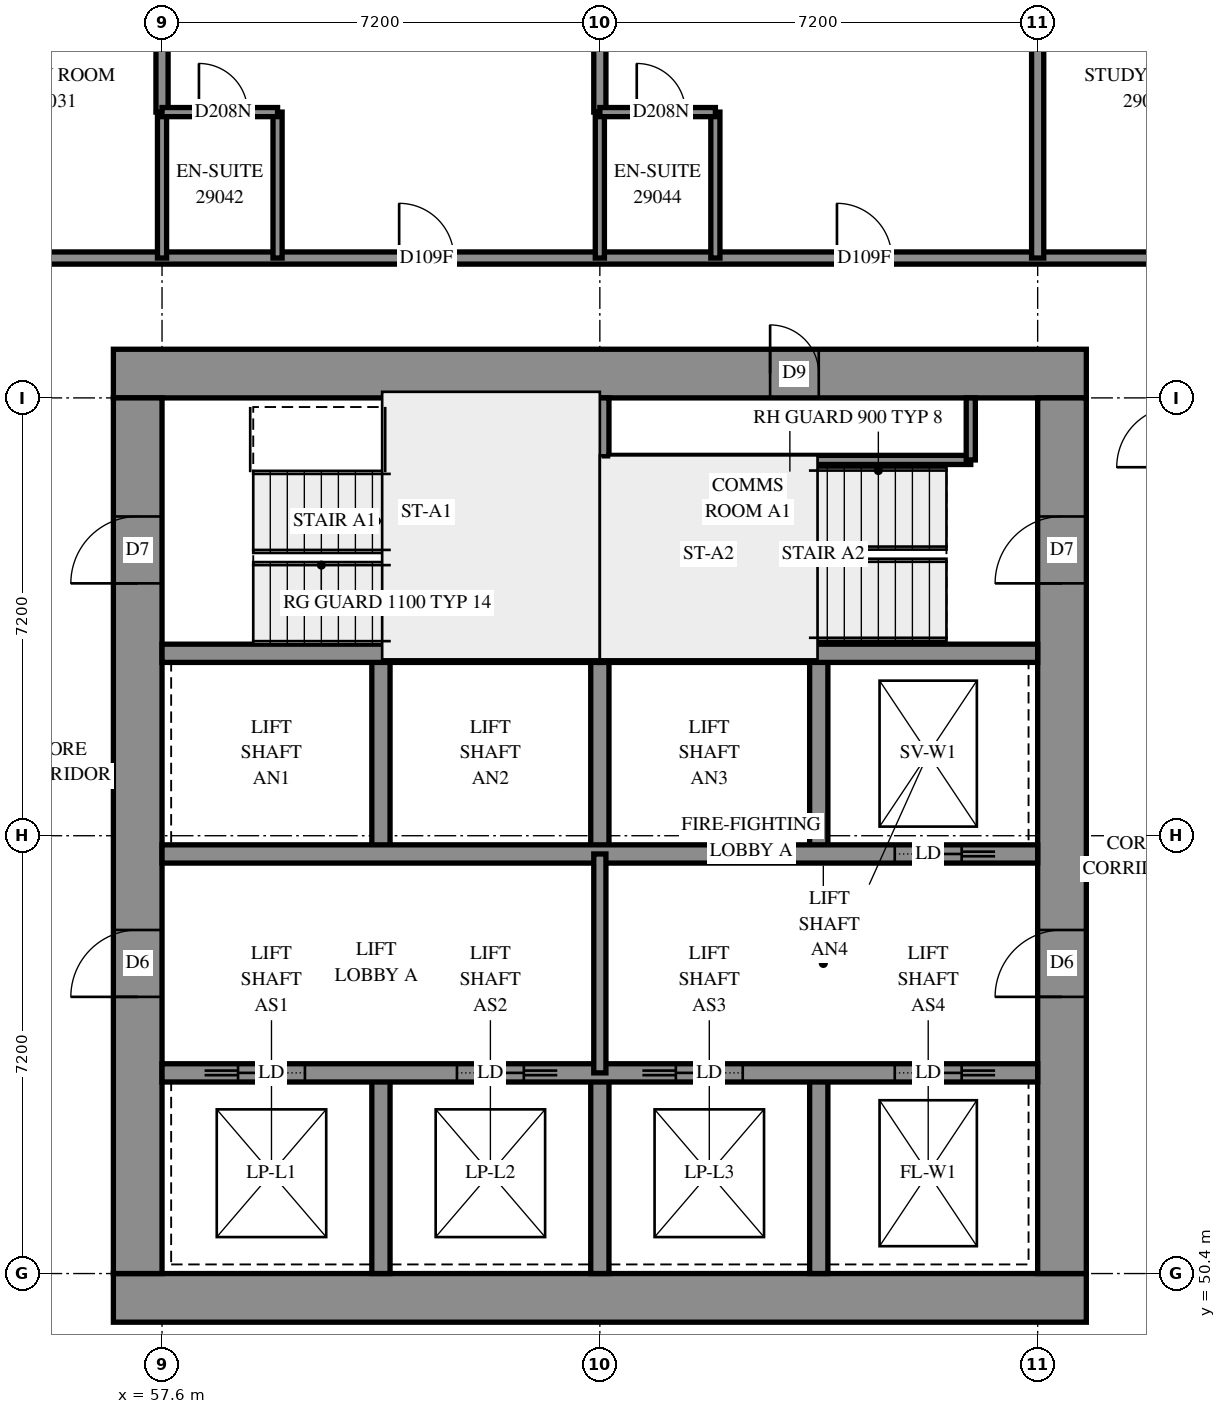
"""IFC4 building model, lengths in metres.
Left out: names, types, materials, properties, quantities, classifications, styles, units other than length and angle.
Written with IfcOpenShell. Run it as: python <this file> out.ifc"""

import sys

from ifc_helpers import new_model, si_unit, direction, frame, frame_2d, origin, place, context, subcontext, project, spatial, rectangle, extrude, element, fill, save


model = new_model("IFC4")
c1 = context("Model", 3, precision=1e-05, world=origin(), true_north=direction((0.0, 1.0)))
c2 = subcontext(c1, "Body", "Model", "MODEL_VIEW")
j1 = project(units=[si_unit("LENGTHUNIT", "METRE"), si_unit("PLANEANGLEUNIT", "RADIAN")], contexts=[c1])
p1 = place(None, origin())
s1 = spatial("IfcSite", under=j1, at=p1, CompositionType="ELEMENT")
p2 = place(p1, origin())
s2 = spatial("IfcBuilding", under=s1, at=p2, CompositionType="ELEMENT")
p3 = place(p2, frame((0.0, 0.0, 108.4)))
s3 = spatial("IfcBuildingStorey", under=s2, at=p3, CompositionType="ELEMENT", Elevation=108.4)
p4 = place(p3, frame((56.8, 50.0, -0.3), z_axis=(0.0, 0.0, 1.0), x_axis=(1.0, 0.0, 0.0)))
e1 = element("IfcWall", 1, at=p4, inside=s3, PredefinedType="SHEAR", context=c2, shape_type="SweptSolid", body=[
    extrude(rectangle(XDim=16.0, YDim=0.8, at=frame_2d((8.0, 0.0))), origin(), (0.0, 0.0, 1.0), 2.7),
])
p5 = place(p3, frame((56.8, 65.2, -0.3), z_axis=(0.0, 0.0, 1.0), x_axis=(1.0, 0.0, 0.0)))
e2 = element("IfcWall", 2, at=p5, inside=s3, PredefinedType="SHEAR", context=c2, shape_type="SweptSolid", body=[
    extrude(rectangle(XDim=16.0, YDim=0.8, at=frame_2d((8.0, 0.0))), origin(), (0.0, 0.0, 1.0), 2.7),
])
p6 = place(p5, frame((10.8, 0.0, 0.3)))
e3 = element("IfcOpeningElement", 3, at=p6, cuts=e2, PredefinedType="OPENING", context=c2, shape_type="SweptSolid", body=[
    extrude(rectangle(XDim=0.8, YDim=2.1, at=frame_2d((0.4, 1.05))), frame((0.0, 0.41, 0.0), z_axis=(0.0, -1.0, 0.0), x_axis=(1.0, 0.0, 0.0)), (0.0, 0.0, 1.0), 0.82),
])
p7 = place(p3, frame((57.2, 50.4, -0.3), z_axis=(0.0, 0.0, 1.0), x_axis=(0.0, 1.0, 0.0)))
e4 = element("IfcWall", 4, at=p7, inside=s3, PredefinedType="SHEAR", context=c2, shape_type="SweptSolid", body=[
    extrude(rectangle(XDim=14.4, YDim=0.8, at=frame_2d((7.2, 0.0))), origin(), (0.0, 0.0, 1.0), 2.7),
])
p8 = place(p7, frame((4.55, 0.0, 0.3)))
e5 = element("IfcOpeningElement", 5, at=p8, cuts=e4, PredefinedType="OPENING", context=c2, shape_type="SweptSolid", body=[
    extrude(rectangle(XDim=1.1, YDim=2.1, at=frame_2d((0.55, 1.05))), frame((0.0, 0.41, 0.0), z_axis=(0.0, -1.0, 0.0), x_axis=(1.0, 0.0, 0.0)), (0.0, 0.0, 1.0), 0.82),
])
p9 = place(p7, frame((11.35, 0.0, 0.3)))
e6 = element("IfcOpeningElement", 6, at=p9, cuts=e4, PredefinedType="OPENING", context=c2, shape_type="SweptSolid", body=[
    extrude(rectangle(XDim=1.1, YDim=2.1, at=frame_2d((0.55, 1.05))), frame((0.0, 0.41, 0.0), z_axis=(0.0, -1.0, 0.0), x_axis=(1.0, 0.0, 0.0)), (0.0, 0.0, 1.0), 0.82),
])
p10 = place(p3, frame((72.4, 50.4, -0.3), z_axis=(0.0, 0.0, 1.0), x_axis=(0.0, 1.0, 0.0)))
e7 = element("IfcWall", 7, at=p10, inside=s3, PredefinedType="SHEAR", context=c2, shape_type="SweptSolid", body=[
    extrude(rectangle(XDim=14.4, YDim=0.8, at=frame_2d((7.2, 0.0))), origin(), (0.0, 0.0, 1.0), 2.7),
])
p11 = place(p10, frame((4.55, 0.0, 0.3)))
e8 = element("IfcOpeningElement", 8, at=p11, cuts=e7, PredefinedType="OPENING", context=c2, shape_type="SweptSolid", body=[
    extrude(rectangle(XDim=1.1, YDim=2.1, at=frame_2d((0.55, 1.05))), frame((0.0, 0.41, 0.0), z_axis=(0.0, -1.0, 0.0), x_axis=(1.0, 0.0, 0.0)), (0.0, 0.0, 1.0), 0.82),
])
p12 = place(p10, frame((11.35, 0.0, 0.3)))
e9 = element("IfcOpeningElement", 9, at=p12, cuts=e7, PredefinedType="OPENING", context=c2, shape_type="SweptSolid", body=[
    extrude(rectangle(XDim=1.1, YDim=2.1, at=frame_2d((0.55, 1.05))), frame((0.0, 0.41, 0.0), z_axis=(0.0, -1.0, 0.0), x_axis=(1.0, 0.0, 0.0)), (0.0, 0.0, 1.0), 0.82),
])
for number, where, z_axis, x_axis in (
    (10, (61.2, 50.4, 0.0), (0.0, 0.0, 1.0), (0.0, 1.0, 0.0)),
    (11, (61.2, 57.3, 0.0), (0.0, 0.0, 1.0), (0.0, 1.0, 0.0)),
    (12, (64.8, 50.4, 0.0), (0.0, 0.0, 1.0), (0.0, 1.0, 0.0)),
    (13, (64.8, 57.3, 0.0), (0.0, 0.0, 1.0), (0.0, 1.0, 0.0)),
    (14, (68.4, 50.4, 0.0), (0.0, 0.0, 1.0), (0.0, 1.0, 0.0)),
    (15, (68.4, 57.3, 0.0), (0.0, 0.0, 1.0), (0.0, 1.0, 0.0)),
):
    element("IfcWall", number, at=place(p3, frame(where, z_axis=z_axis, x_axis=x_axis)), inside=s3, PredefinedType="SOLIDWALL", context=c2, shape_type="SweptSolid", body=[
        extrude(rectangle(XDim=3.3, YDim=0.3, at=frame_2d((1.65, 0.0))), origin(), (0.0, 0.0, 1.0), 3.1),
    ])
p13 = place(p3, frame((57.6, 53.7, 0.0), z_axis=(0.0, 0.0, 1.0), x_axis=(1.0, 0.0, 0.0)))
e16 = element("IfcWall", 16, at=p13, inside=s3, PredefinedType="SOLIDWALL", context=c2, shape_type="SweptSolid", body=[
    extrude(rectangle(XDim=14.4, YDim=0.3, at=frame_2d((7.2, 0.0))), origin(), (0.0, 0.0, 1.0), 3.1),
])
p14 = place(p13, frame((1.25, 0.0, 0.0)))
e17 = element("IfcOpeningElement", 17, at=p14, cuts=e16, PredefinedType="OPENING", context=c2, shape_type="SweptSolid", body=[
    extrude(rectangle(XDim=1.1, YDim=2.1, at=frame_2d((0.55, 1.05))), frame((0.0, 0.16, 0.0), z_axis=(0.0, -1.0, 0.0), x_axis=(1.0, 0.0, 0.0)), (0.0, 0.0, 1.0), 0.32),
])
p15 = place(p13, frame((4.85, 0.0, 0.0)))
e18 = element("IfcOpeningElement", 18, at=p15, cuts=e16, PredefinedType="OPENING", context=c2, shape_type="SweptSolid", body=[
    extrude(rectangle(XDim=1.1, YDim=2.1, at=frame_2d((0.55, 1.05))), frame((0.0, 0.16, 0.0), z_axis=(0.0, -1.0, 0.0), x_axis=(1.0, 0.0, 0.0)), (0.0, 0.0, 1.0), 0.32),
])
p16 = place(p13, frame((8.45, 0.0, 0.0)))
e19 = element("IfcOpeningElement", 19, at=p16, cuts=e16, PredefinedType="OPENING", context=c2, shape_type="SweptSolid", body=[
    extrude(rectangle(XDim=1.1, YDim=2.1, at=frame_2d((0.55, 1.05))), frame((0.0, 0.16, 0.0), z_axis=(0.0, -1.0, 0.0), x_axis=(1.0, 0.0, 0.0)), (0.0, 0.0, 1.0), 0.32),
])
p17 = place(p13, frame((12.05, 0.0, 0.0)))
e20 = element("IfcOpeningElement", 20, at=p17, cuts=e16, PredefinedType="OPENING", context=c2, shape_type="SweptSolid", body=[
    extrude(rectangle(XDim=1.1, YDim=2.1, at=frame_2d((0.55, 1.05))), frame((0.0, 0.16, 0.0), z_axis=(0.0, -1.0, 0.0), x_axis=(1.0, 0.0, 0.0)), (0.0, 0.0, 1.0), 0.32),
])
p18 = place(p3, frame((57.6, 57.3, 0.0), z_axis=(0.0, 0.0, 1.0), x_axis=(1.0, 0.0, 0.0)))
e21 = element("IfcWall", 21, at=p18, inside=s3, PredefinedType="SOLIDWALL", context=c2, shape_type="SweptSolid", body=[
    extrude(rectangle(XDim=14.4, YDim=0.3, at=frame_2d((7.2, 0.0))), origin(), (0.0, 0.0, 1.0), 3.1),
])
p19 = place(p18, frame((12.05, 0.0, 0.0)))
e22 = element("IfcOpeningElement", 22, at=p19, cuts=e21, PredefinedType="OPENING", context=c2, shape_type="SweptSolid", body=[
    extrude(rectangle(XDim=1.1, YDim=2.1, at=frame_2d((0.55, 1.05))), frame((0.0, 0.16, 0.0), z_axis=(0.0, -1.0, 0.0), x_axis=(1.0, 0.0, 0.0)), (0.0, 0.0, 1.0), 0.32),
])
for number, where, z_axis, x_axis in (
    (23, (57.6, 60.6, 0.0), (0.0, 0.0, 1.0), (1.0, 0.0, 0.0)),
    (24, (64.8, 60.6, 0.0), (0.0, 0.0, 1.0), (1.0, 0.0, 0.0)),
):
    element("IfcWall", number, at=place(p3, frame(where, z_axis=z_axis, x_axis=x_axis)), inside=s3, PredefinedType="SOLIDWALL", context=c2, shape_type="SweptSolid", body=[
        extrude(rectangle(XDim=7.2, YDim=0.3, at=frame_2d((3.6, 0.0))), origin(), (0.0, 0.0, 1.0), 3.1),
    ])
p20 = place(p3, frame((64.8, 60.6, 0.0), z_axis=(0.0, 0.0, 1.0), x_axis=(0.0, 1.0, 0.0)))
e25 = element("IfcWall", 25, at=p20, inside=s3, PredefinedType="SOLIDWALL", context=c2, shape_type="SweptSolid", body=[
    extrude(rectangle(XDim=4.2, YDim=0.3, at=frame_2d((2.1, 0.0))), origin(), (0.0, 0.0, 1.0), 3.1),
])
p21 = place(p3, frame((64.95, 63.78, 0.0), z_axis=(0.0, 0.0, 1.0), x_axis=(1.0, 0.0, 0.0)))
e26 = element("IfcWall", 26, at=p21, inside=s3, PredefinedType="PARTITIONING", context=c2, shape_type="SweptSolid", body=[
    extrude(rectangle(XDim=5.95, YDim=0.15, at=frame_2d((2.975, 0.0))), origin(), (0.0, 0.0, 1.0), 3.1),
])
p22 = place(p3, frame((70.9, 63.78, 0.0), z_axis=(0.0, 0.0, 1.0), x_axis=(0.0, 1.0, 0.0)))
e27 = element("IfcWall", 27, at=p22, inside=s3, PredefinedType="PARTITIONING", context=c2, shape_type="SweptSolid", body=[
    extrude(rectangle(XDim=1.02, YDim=0.15, at=frame_2d((0.51, 0.0))), origin(), (0.0, 0.0, 1.0), 3.1),
])
p23 = place(p3, frame((64.8, 53.7, 0.0), z_axis=(0.0, 0.0, 1.0), x_axis=(0.0, 1.0, 0.0)))
e28 = element("IfcWall", 28, at=p23, inside=s3, PredefinedType="PARTITIONING", context=c2, shape_type="SweptSolid", body=[
    extrude(rectangle(XDim=3.6, YDim=0.2, at=frame_2d((1.8, 0.0))), origin(), (0.0, 0.0, 1.0), 3.1),
])
p24 = place(p3, frame((55.3, 67.1, 0.0), z_axis=(0.0, 0.0, 1.0), x_axis=(1.0, 0.0, 0.0)))
e29 = element("IfcWall", 29, at=p24, inside=s3, PredefinedType="PARTITIONING", context=c2, shape_type="SweptSolid", body=[
    extrude(rectangle(XDim=19.0, YDim=0.2, at=frame_2d((9.5, 0.0))), origin(), (0.0, 0.0, 1.0), 3.1),
])
p25 = place(p24, frame((6.199, 0.0, 0.0)))
e30 = element("IfcOpeningElement", 30, at=p25, cuts=e29, PredefinedType="OPENING", context=c2, shape_type="SweptSolid", body=[
    extrude(rectangle(XDim=0.9, YDim=2.1, at=frame_2d((0.45, 1.05))), frame((0.0, 0.11, 0.0), z_axis=(0.0, -1.0, 0.0), x_axis=(1.0, 0.0, 0.0)), (0.0, 0.0, 1.0), 0.22),
])
p26 = place(p24, frame((13.399, 0.0, 0.0)))
e31 = element("IfcOpeningElement", 31, at=p26, cuts=e29, PredefinedType="OPENING", context=c2, shape_type="SweptSolid", body=[
    extrude(rectangle(XDim=0.9, YDim=2.1, at=frame_2d((0.45, 1.05))), frame((0.0, 0.11, 0.0), z_axis=(0.0, -1.0, 0.0), x_axis=(1.0, 0.0, 0.0)), (0.0, 0.0, 1.0), 0.22),
])
p27 = place(p3, frame((72.0, 67.1, 0.0), z_axis=(0.0, 0.0, 1.0), x_axis=(0.0, 1.0, 0.0)))
e32 = element("IfcWall", 32, at=p27, inside=s3, PredefinedType="PARTITIONING", context=c2, shape_type="SweptSolid", body=[
    extrude(rectangle(XDim=4.4, YDim=0.2, at=frame_2d((2.2, 0.0))), origin(), (0.0, 0.0, 1.0), 3.1),
])
for number, where, z_axis, x_axis in (
    (33, (59.5, 67.1, 0.0), (0.0, 0.0, 1.0), (0.0, 1.0, 0.0)),
    (34, (57.6, 67.1, 0.0), (0.0, 0.0, 1.0), (0.0, 1.0, 0.0)),
    (35, (64.8, 67.1, 0.0), (0.0, 0.0, 1.0), (0.0, 1.0, 0.0)),
    (36, (66.7, 67.1, 0.0), (0.0, 0.0, 1.0), (0.0, 1.0, 0.0)),
):
    element("IfcWall", number, at=place(p3, frame(where, z_axis=z_axis, x_axis=x_axis)), inside=s3, PredefinedType="PARTITIONING", context=c2, shape_type="SweptSolid", body=[
        extrude(rectangle(XDim=2.4, YDim=0.15, at=frame_2d((1.2, 0.0))), origin(), (0.0, 0.0, 1.0), 3.1),
    ])
for number, where, z_axis, x_axis in (
    (37, (57.6, 69.5, 0.0), (0.0, 0.0, 1.0), (0.0, 1.0, 0.0)),
    (38, (64.8, 69.5, 0.0), (0.0, 0.0, 1.0), (0.0, 1.0, 0.0)),
):
    element("IfcWall", number, at=place(p3, frame(where, z_axis=z_axis, x_axis=x_axis)), inside=s3, PredefinedType="PARTITIONING", context=c2, shape_type="SweptSolid", body=[
        extrude(rectangle(XDim=2.0, YDim=0.2, at=frame_2d((1.0, 0.0))), origin(), (0.0, 0.0, 1.0), 3.1),
    ])
p28 = place(p3, frame((64.8, 69.5, 0.0), z_axis=(0.0, 0.0, 1.0), x_axis=(1.0, 0.0, 0.0)))
e39 = element("IfcWall", 39, at=p28, inside=s3, PredefinedType="PARTITIONING", context=c2, shape_type="SweptSolid", body=[
    extrude(rectangle(XDim=1.9, YDim=0.15, at=frame_2d((0.95, 0.0))), origin(), (0.0, 0.0, 1.0), 3.1),
])
p29 = place(p28, frame((0.607, 0.0, 0.0)))
e40 = element("IfcOpeningElement", 40, at=p29, cuts=e39, PredefinedType="OPENING", context=c2, shape_type="SweptSolid", body=[
    extrude(rectangle(XDim=0.8, YDim=2.1, at=frame_2d((0.4, 1.05))), frame((0.0, 0.085, 0.0), z_axis=(0.0, -1.0, 0.0), x_axis=(1.0, 0.0, 0.0)), (0.0, 0.0, 1.0), 0.17),
])
p30 = place(p3, frame((57.6, 69.5, 0.0), z_axis=(0.0, 0.0, 1.0), x_axis=(1.0, 0.0, 0.0)))
e41 = element("IfcWall", 41, at=p30, inside=s3, PredefinedType="PARTITIONING", context=c2, shape_type="SweptSolid", body=[
    extrude(rectangle(XDim=1.9, YDim=0.15, at=frame_2d((0.95, 0.0))), origin(), (0.0, 0.0, 1.0), 3.1),
])
p31 = place(p30, frame((0.607, 0.0, 0.0)))
e42 = element("IfcOpeningElement", 42, at=p31, cuts=e41, PredefinedType="OPENING", context=c2, shape_type="SweptSolid", body=[
    extrude(rectangle(XDim=0.8, YDim=2.1, at=frame_2d((0.4, 1.05))), frame((0.0, 0.085, 0.0), z_axis=(0.0, -1.0, 0.0), x_axis=(1.0, 0.0, 0.0)), (0.0, 0.0, 1.0), 0.17),
])
p32 = place(p6, origin())
e43 = element("IfcDoor", 43, at=p32, inside=s3, OperationType="SINGLE_SWING_RIGHT", PredefinedType="DOOR", context=c2, shape_type="SweptSolid", body=[
    extrude(rectangle(XDim=0.8, YDim=2.1, at=frame_2d((0.4, 1.05))), frame((0.0, -0.34, 0.0), z_axis=(0.0, -1.0, 0.0), x_axis=(1.0, 0.0, 0.0)), (0.0, 0.0, 1.0), 0.05),
])
fill(e3, e43)
p33 = place(p8, origin())
e44 = element("IfcDoor", 44, at=p33, inside=s3, OperationType="DOUBLE_DOOR_SINGLE_SWING", PredefinedType="DOOR", context=c2, shape_type="SweptSolid", body=[
    extrude(rectangle(XDim=1.1, YDim=2.1, at=frame_2d((0.55, 1.05))), frame((0.0, 0.025, 0.0), z_axis=(0.0, -1.0, 0.0), x_axis=(1.0, 0.0, 0.0)), (0.0, 0.0, 1.0), 0.05),
])
fill(e5, e44)
p34 = place(p11, origin())
e45 = element("IfcDoor", 45, at=p34, inside=s3, OperationType="DOUBLE_DOOR_SINGLE_SWING", PredefinedType="DOOR", context=c2, shape_type="SweptSolid", body=[
    extrude(rectangle(XDim=1.1, YDim=2.1, at=frame_2d((0.55, 1.05))), frame((0.0, 0.025, 0.0), z_axis=(0.0, -1.0, 0.0), x_axis=(1.0, 0.0, 0.0)), (0.0, 0.0, 1.0), 0.05),
])
fill(e8, e45)
p35 = place(p9, origin())
e46 = element("IfcDoor", 46, at=p35, inside=s3, OperationType="SINGLE_SWING_LEFT", PredefinedType="DOOR", context=c2, shape_type="SweptSolid", body=[
    extrude(rectangle(XDim=1.1, YDim=2.1, at=frame_2d((0.55, 1.05))), frame((0.0, 0.025, 0.0), z_axis=(0.0, -1.0, 0.0), x_axis=(1.0, 0.0, 0.0)), (0.0, 0.0, 1.0), 0.05),
])
fill(e6, e46)
p36 = place(p12, origin())
e47 = element("IfcDoor", 47, at=p36, inside=s3, OperationType="SINGLE_SWING_RIGHT", PredefinedType="DOOR", context=c2, shape_type="SweptSolid", body=[
    extrude(rectangle(XDim=1.1, YDim=2.1, at=frame_2d((0.55, 1.05))), frame((0.0, 0.025, 0.0), z_axis=(0.0, -1.0, 0.0), x_axis=(1.0, 0.0, 0.0)), (0.0, 0.0, 1.0), 0.05),
])
fill(e9, e47)
p37 = place(p14, origin())
e48 = element("IfcDoor", 48, at=p37, inside=s3, OperationType="SLIDING_TO_LEFT", PredefinedType="DOOR", context=c2, shape_type="SweptSolid", body=[
    extrude(rectangle(XDim=1.1, YDim=2.1, at=frame_2d((0.55, 1.05))), frame((0.0, 0.025, 0.0), z_axis=(0.0, -1.0, 0.0), x_axis=(1.0, 0.0, 0.0)), (0.0, 0.0, 1.0), 0.05),
])
fill(e17, e48)
p38 = place(p15, origin())
e49 = element("IfcDoor", 49, at=p38, inside=s3, OperationType="SLIDING_TO_RIGHT", PredefinedType="DOOR", context=c2, shape_type="SweptSolid", body=[
    extrude(rectangle(XDim=1.1, YDim=2.1, at=frame_2d((0.55, 1.05))), frame((0.0, 0.025, 0.0), z_axis=(0.0, -1.0, 0.0), x_axis=(1.0, 0.0, 0.0)), (0.0, 0.0, 1.0), 0.05),
])
fill(e18, e49)
p39 = place(p16, origin())
e50 = element("IfcDoor", 50, at=p39, inside=s3, OperationType="SLIDING_TO_LEFT", PredefinedType="DOOR", context=c2, shape_type="SweptSolid", body=[
    extrude(rectangle(XDim=1.1, YDim=2.1, at=frame_2d((0.55, 1.05))), frame((0.0, 0.025, 0.0), z_axis=(0.0, -1.0, 0.0), x_axis=(1.0, 0.0, 0.0)), (0.0, 0.0, 1.0), 0.05),
])
fill(e19, e50)
p40 = place(p17, origin())
e51 = element("IfcDoor", 51, at=p40, inside=s3, OperationType="SLIDING_TO_RIGHT", PredefinedType="DOOR", context=c2, shape_type="SweptSolid", body=[
    extrude(rectangle(XDim=1.1, YDim=2.1, at=frame_2d((0.55, 1.05))), frame((0.0, 0.025, 0.0), z_axis=(0.0, -1.0, 0.0), x_axis=(1.0, 0.0, 0.0)), (0.0, 0.0, 1.0), 0.05),
])
fill(e20, e51)
p41 = place(p19, origin())
e52 = element("IfcDoor", 52, at=p41, inside=s3, OperationType="SLIDING_TO_RIGHT", PredefinedType="DOOR", context=c2, shape_type="SweptSolid", body=[
    extrude(rectangle(XDim=1.1, YDim=2.1, at=frame_2d((0.55, 1.05))), frame((0.0, 0.025, 0.0), z_axis=(0.0, -1.0, 0.0), x_axis=(1.0, 0.0, 0.0)), (0.0, 0.0, 1.0), 0.05),
])
fill(e22, e52)
p42 = place(p25, origin())
e53 = element("IfcDoor", 53, at=p42, inside=s3, OperationType="SINGLE_SWING_RIGHT", PredefinedType="DOOR", context=c2, shape_type="SweptSolid", body=[
    extrude(rectangle(XDim=0.9, YDim=2.1, at=frame_2d((0.45, 1.05))), frame((0.0, 0.025, 0.0), z_axis=(0.0, -1.0, 0.0), x_axis=(1.0, 0.0, 0.0)), (0.0, 0.0, 1.0), 0.05),
])
fill(e30, e53)
p43 = place(p31, origin())
e54 = element("IfcDoor", 54, at=p43, inside=s3, OperationType="SINGLE_SWING_RIGHT", PredefinedType="DOOR", context=c2, shape_type="SweptSolid", body=[
    extrude(rectangle(XDim=0.8, YDim=2.1, at=frame_2d((0.4, 1.05))), frame((0.0, 0.025, 0.0), z_axis=(0.0, -1.0, 0.0), x_axis=(1.0, 0.0, 0.0)), (0.0, 0.0, 1.0), 0.05),
])
fill(e42, e54)
p44 = place(p26, origin())
e55 = element("IfcDoor", 55, at=p44, inside=s3, OperationType="SINGLE_SWING_RIGHT", PredefinedType="DOOR", context=c2, shape_type="SweptSolid", body=[
    extrude(rectangle(XDim=0.9, YDim=2.1, at=frame_2d((0.45, 1.05))), frame((0.0, 0.025, 0.0), z_axis=(0.0, -1.0, 0.0), x_axis=(1.0, 0.0, 0.0)), (0.0, 0.0, 1.0), 0.05),
])
fill(e31, e55)
p45 = place(p29, origin())
e56 = element("IfcDoor", 56, at=p45, inside=s3, OperationType="SINGLE_SWING_RIGHT", PredefinedType="DOOR", context=c2, shape_type="SweptSolid", body=[
    extrude(rectangle(XDim=0.8, YDim=2.1, at=frame_2d((0.4, 1.05))), frame((0.0, 0.025, 0.0), z_axis=(0.0, -1.0, 0.0), x_axis=(1.0, 0.0, 0.0)), (0.0, 0.0, 1.0), 0.05),
])
fill(e40, e56)
save(model, sys.argv[1])
